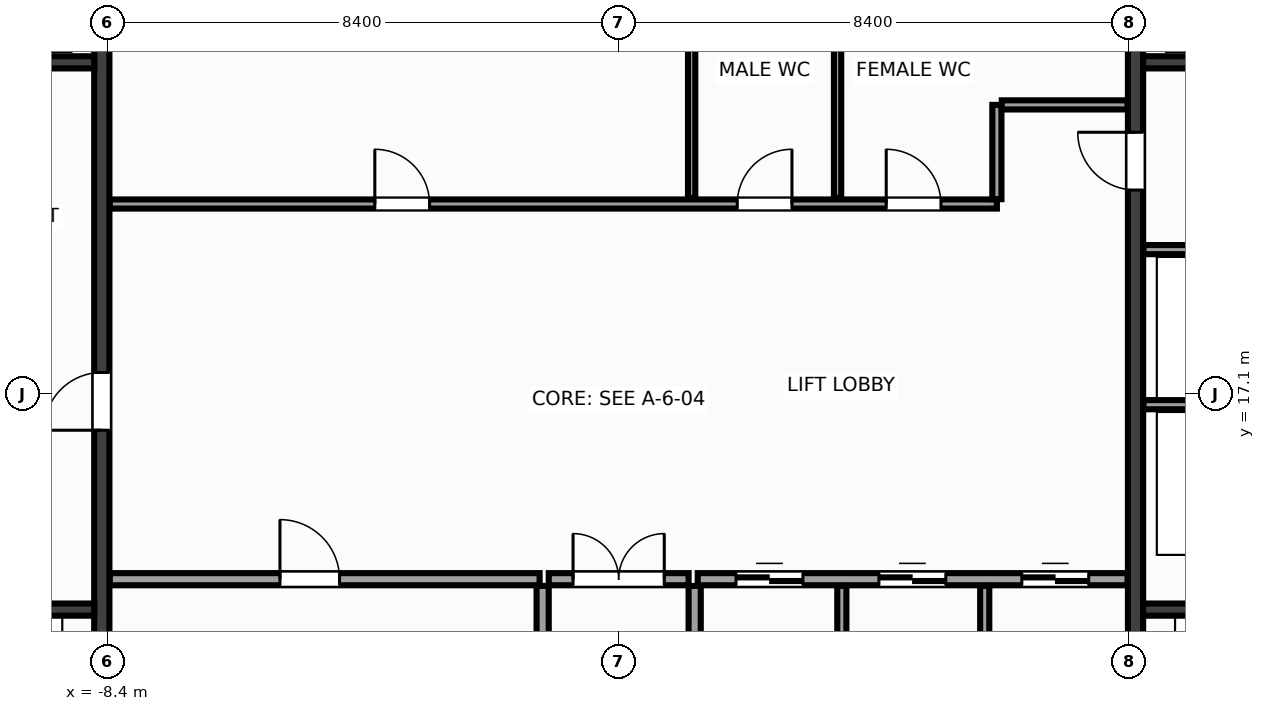
"""IFC4 building model, lengths in metres.
Left out: names, types, materials, properties, quantities, classifications, styles, units other than length and angle.
Written with IfcOpenShell. Run it as: python <this file> out.ifc"""

import sys

from ifc_helpers import new_model, si_unit, direction, frame, frame_2d, origin, place, context, subcontext, project, spatial, rectangle, extrude, source, transform, mapped, element, fill, save


model = new_model("IFC4")
c1 = context("Model", 3, precision=1e-05, world=origin(), true_north=direction((0.0, 1.0)))
c2 = subcontext(c1, "Body", "Model", "MODEL_VIEW")
j1 = project(units=[si_unit("LENGTHUNIT", "METRE"), si_unit("PLANEANGLEUNIT", "RADIAN")], contexts=[c1])
p1 = place(None, origin())
s1 = spatial("IfcSite", under=j1, at=p1, CompositionType="ELEMENT")
p2 = place(p1, origin())
s2 = spatial("IfcBuilding", under=s1, at=p2, CompositionType="ELEMENT")
p3 = place(p2, frame((0.0, 0.0, 88.4)))
s3 = spatial("IfcBuildingStorey", under=s2, at=p3, CompositionType="ELEMENT", Elevation=88.4)
m1 = source(origin(), c2, "Body", "SweptSolid", [
    extrude(rectangle(XDim=12.95, YDim=0.25, at=frame_2d((6.475, 0.0))), origin(), (0.0, 0.0, 1.0), 3.6),
])
p4 = place(p3, frame((-8.5, 10.525, 0.0), z_axis=(0.0, 0.0, 1.0), x_axis=(0.0, 1.0, 0.0)))
e1 = element("IfcWall", 1, at=p4, inside=s3, PredefinedType="SHEAR", context=c2, shape_type="MappedRepresentation", body=[
    mapped(m1, transform((0.0, 0.0, 0.0), x_axis=(1.0, 0.0, 0.0), y_axis=(0.0, 1.0, 0.0), z_axis=(0.0, 0.0, 1.0), scale=1.0)),
])
p5 = place(p4, frame((5.975, 0.0, 0.0)))
e2 = element("IfcOpeningElement", 2, at=p5, cuts=e1, PredefinedType="OPENING", context=c2, shape_type="SweptSolid", body=[
    extrude(rectangle(XDim=0.95, YDim=2.15, at=frame_2d((0.475, 1.075))), frame((0.0, 0.137, 0.0), z_axis=(0.0, -1.0, 0.0), x_axis=(1.0, 0.0, 0.0)), (0.0, 0.0, 1.0), 0.274),
])
p6 = place(p3, frame((8.5, 10.525, 0.0), z_axis=(0.0, 0.0, 1.0), x_axis=(0.0, 1.0, 0.0)))
e3 = element("IfcWall", 3, at=p6, inside=s3, PredefinedType="SHEAR", context=c2, shape_type="MappedRepresentation", body=[
    mapped(m1, transform((0.0, 0.0, 0.0), x_axis=(1.0, 0.0, 0.0), y_axis=(0.0, 1.0, 0.0), z_axis=(0.0, 0.0, 1.0), scale=1.0)),
])
p7 = place(p6, frame((9.925, 0.0, 0.0)))
e4 = element("IfcOpeningElement", 4, at=p7, cuts=e3, PredefinedType="OPENING", context=c2, shape_type="SweptSolid", body=[
    extrude(rectangle(XDim=0.95, YDim=2.15, at=frame_2d((0.475, 1.075))), frame((0.0, 0.137, 0.0), z_axis=(0.0, -1.0, 0.0), x_axis=(1.0, 0.0, 0.0)), (0.0, 0.0, 1.0), 0.274),
])
m2 = source(origin(), c2, "Body", "SweptSolid", [
    extrude(rectangle(XDim=2.825, YDim=0.2, at=frame_2d((1.413, 0.0))), origin(), (0.0, 0.0, 1.0), 3.6),
])
for number, where, z_axis, x_axis in (
    (5, (-11.45, 13.55, 0.0), (0.0, 0.0, 1.0), (1.0, 0.0, 0.0)),
    (6, (8.625, 13.55, 0.0), (0.0, 0.0, 1.0), (1.0, 0.0, 0.0)),
):
    element("IfcWall", number, at=place(p3, frame(where, z_axis=z_axis, x_axis=x_axis)), inside=s3, PredefinedType="SHEAR", context=c2, shape_type="MappedRepresentation", body=[
        mapped(m2, transform((0.0, 0.0, 0.0), x_axis=(1.0, 0.0, 0.0), y_axis=(0.0, 1.0, 0.0), z_axis=(0.0, 0.0, 1.0), scale=1.0)),
    ])
m3 = source(origin(), c2, "Body", "SweptSolid", [
    extrude(rectangle(XDim=3.02, YDim=0.2, at=frame_2d((1.51, 0.0))), origin(), (0.0, 0.0, 1.0), 3.6),
])
for number, where, z_axis, x_axis in (
    (7, (-11.645, 22.55, 0.0), (0.0, 0.0, 1.0), (1.0, 0.0, 0.0)),
    (8, (8.625, 22.55, 0.0), (0.0, 0.0, 1.0), (1.0, 0.0, 0.0)),
):
    element("IfcWall", number, at=place(p3, frame(where, z_axis=z_axis, x_axis=x_axis)), inside=s3, PredefinedType="SHEAR", context=c2, shape_type="MappedRepresentation", body=[
        mapped(m3, transform((0.0, 0.0, 0.0), x_axis=(1.0, 0.0, 0.0), y_axis=(0.0, 1.0, 0.0), z_axis=(0.0, 0.0, 1.0), scale=1.0)),
    ])
m4 = source(origin(), c2, "Body", "SweptSolid", [
    extrude(rectangle(XDim=3.01, YDim=0.15, at=frame_2d((1.505, 0.0))), origin(), (0.0, 0.0, 1.0), 3.36),
])
for number, where, z_axis, x_axis in (
    (9, (8.63, 16.92, 0.0), (0.0, 0.0, 1.0), (1.0, 0.0, 0.0)),
    (10, (8.63, 19.47, 0.0), (0.0, 0.0, 1.0), (1.0, 0.0, 0.0)),
):
    element("IfcWall", number, at=place(p3, frame(where, z_axis=z_axis, x_axis=x_axis)), inside=s3, PredefinedType="PARTITIONING", context=c2, shape_type="MappedRepresentation", body=[
        mapped(m4, transform((0.0, 0.0, 0.0), x_axis=(1.0, 0.0, 0.0), y_axis=(0.0, 1.0, 0.0), z_axis=(0.0, 0.0, 1.0), scale=1.0)),
    ])
m5 = source(origin(), c2, "Body", "SweptSolid", [
    extrude(rectangle(XDim=7.07, YDim=0.2, at=frame_2d((3.535, 0.0))), origin(), (0.0, 0.0, 1.0), 3.36),
])
p8 = place(p3, frame((-8.37, 14.05, 0.0), z_axis=(0.0, 0.0, 1.0), x_axis=(1.0, 0.0, 0.0)))
e11 = element("IfcWall", 11, at=p8, inside=s3, PredefinedType="PARTITIONING", context=c2, shape_type="MappedRepresentation", body=[
    mapped(m5, transform((0.0, 0.0, 0.0), x_axis=(1.0, 0.0, 0.0), y_axis=(0.0, 1.0, 0.0), z_axis=(0.0, 0.0, 1.0), scale=1.0)),
])
p9 = place(p8, frame((2.8, 0.0, 0.0)))
e12 = element("IfcOpeningElement", 12, at=p9, cuts=e11, PredefinedType="OPENING", context=c2, shape_type="SweptSolid", body=[
    extrude(rectangle(XDim=0.98, YDim=2.15, at=frame_2d((0.49, 1.075))), frame((0.0, 0.112, 0.0), z_axis=(0.0, -1.0, 0.0), x_axis=(1.0, 0.0, 0.0)), (0.0, 0.0, 1.0), 0.224),
])
p10 = place(p3, frame((1.3, 14.05, 0.0), z_axis=(0.0, 0.0, 1.0), x_axis=(1.0, 0.0, 0.0)))
e13 = element("IfcWall", 13, at=p10, inside=s3, PredefinedType="PARTITIONING", context=c2, shape_type="MappedRepresentation", body=[
    mapped(m5, transform((0.0, 0.0, 0.0), x_axis=(1.0, 0.0, 0.0), y_axis=(0.0, 1.0, 0.0), z_axis=(0.0, 0.0, 1.0), scale=1.0)),
])
p11 = place(p10, frame((0.63, 0.0, 0.0)))
e14 = element("IfcOpeningElement", 14, at=p11, cuts=e13, PredefinedType="OPENING", context=c2, shape_type="SweptSolid", body=[
    extrude(rectangle(XDim=1.1, YDim=2.15, at=frame_2d((0.55, 1.075))), frame((0.0, 0.112, 0.0), z_axis=(0.0, -1.0, 0.0), x_axis=(1.0, 0.0, 0.0)), (0.0, 0.0, 1.0), 0.224),
])
p12 = place(p10, frame((2.98, 0.0, 0.0)))
e15 = element("IfcOpeningElement", 15, at=p12, cuts=e13, PredefinedType="OPENING", context=c2, shape_type="SweptSolid", body=[
    extrude(rectangle(XDim=1.1, YDim=2.15, at=frame_2d((0.55, 1.075))), frame((0.0, 0.112, 0.0), z_axis=(0.0, -1.0, 0.0), x_axis=(1.0, 0.0, 0.0)), (0.0, 0.0, 1.0), 0.224),
])
p13 = place(p10, frame((5.33, 0.0, 0.0)))
e16 = element("IfcOpeningElement", 16, at=p13, cuts=e13, PredefinedType="OPENING", context=c2, shape_type="SweptSolid", body=[
    extrude(rectangle(XDim=1.1, YDim=2.15, at=frame_2d((0.55, 1.075))), frame((0.0, 0.112, 0.0), z_axis=(0.0, -1.0, 0.0), x_axis=(1.0, 0.0, 0.0)), (0.0, 0.0, 1.0), 0.224),
])
m6 = source(origin(), c2, "Body", "SweptSolid", [
    extrude(rectangle(XDim=3.415, YDim=0.2, at=frame_2d((1.708, 0.0))), origin(), (0.0, 0.0, 1.0), 3.36),
])
for number, where, z_axis, x_axis in (
    (17, (-1.25, 10.525, 0.0), (0.0, 0.0, 1.0), (0.0, 1.0, 0.0)),
    (18, (1.25, 10.525, 0.0), (0.0, 0.0, 1.0), (0.0, 1.0, 0.0)),
):
    element("IfcWall", number, at=place(p3, frame(where, z_axis=z_axis, x_axis=x_axis)), inside=s3, PredefinedType="PARTITIONING", context=c2, shape_type="MappedRepresentation", body=[
        mapped(m6, transform((0.0, 0.0, 0.0), x_axis=(1.0, 0.0, 0.0), y_axis=(0.0, 1.0, 0.0), z_axis=(0.0, 0.0, 1.0), scale=1.0)),
    ])
m7 = source(origin(), c2, "Body", "SweptSolid", [
    extrude(rectangle(XDim=2.3, YDim=0.2, at=frame_2d((1.15, 0.0))), origin(), (0.0, 0.0, 1.0), 3.36),
])
p14 = place(p3, frame((-1.15, 14.05, 0.0), z_axis=(0.0, 0.0, 1.0), x_axis=(1.0, 0.0, 0.0)))
e19 = element("IfcWall", 19, at=p14, inside=s3, PredefinedType="PARTITIONING", context=c2, shape_type="MappedRepresentation", body=[
    mapped(m7, transform((0.0, 0.0, 0.0), x_axis=(1.0, 0.0, 0.0), y_axis=(0.0, 1.0, 0.0), z_axis=(0.0, 0.0, 1.0), scale=1.0)),
])
p15 = place(p14, frame((0.4, 0.0, 0.0)))
e20 = element("IfcOpeningElement", 20, at=p15, cuts=e19, PredefinedType="OPENING", context=c2, shape_type="SweptSolid", body=[
    extrude(rectangle(XDim=1.5, YDim=2.2, at=frame_2d((0.75, 1.1))), frame((0.0, 0.112, 0.0), z_axis=(0.0, -1.0, 0.0), x_axis=(1.0, 0.0, 0.0)), (0.0, 0.0, 1.0), 0.224),
])
m8 = source(origin(), c2, "Body", "SweptSolid", [
    extrude(rectangle(XDim=14.59, YDim=0.15, at=frame_2d((7.295, 0.0))), origin(), (0.0, 0.0, 1.0), 3.36),
])
p16 = place(p3, frame((-8.37, 20.22, 0.0), z_axis=(0.0, 0.0, 1.0), x_axis=(1.0, 0.0, 0.0)))
e21 = element("IfcWall", 21, at=p16, inside=s3, PredefinedType="PARTITIONING", context=c2, shape_type="MappedRepresentation", body=[
    mapped(m8, transform((0.0, 0.0, 0.0), x_axis=(1.0, 0.0, 0.0), y_axis=(0.0, 1.0, 0.0), z_axis=(0.0, 0.0, 1.0), scale=1.0)),
])
p17 = place(p16, frame((4.36, 0.0, 0.0)))
e22 = element("IfcOpeningElement", 22, at=p17, cuts=e21, PredefinedType="OPENING", context=c2, shape_type="SweptSolid", body=[
    extrude(rectangle(XDim=0.9, YDim=2.15, at=frame_2d((0.45, 1.075))), frame((0.0, 0.087, 0.0), z_axis=(0.0, -1.0, 0.0), x_axis=(1.0, 0.0, 0.0)), (0.0, 0.0, 1.0), 0.174),
])
p18 = place(p16, frame((10.32, 0.0, 0.0)))
e23 = element("IfcOpeningElement", 23, at=p18, cuts=e21, PredefinedType="OPENING", context=c2, shape_type="SweptSolid", body=[
    extrude(rectangle(XDim=0.9, YDim=2.15, at=frame_2d((0.45, 1.075))), frame((0.0, 0.087, 0.0), z_axis=(0.0, -1.0, 0.0), x_axis=(1.0, 0.0, 0.0)), (0.0, 0.0, 1.0), 0.174),
])
p19 = place(p16, frame((12.77, 0.0, 0.0)))
e24 = element("IfcOpeningElement", 24, at=p19, cuts=e21, PredefinedType="OPENING", context=c2, shape_type="SweptSolid", body=[
    extrude(rectangle(XDim=0.9, YDim=2.15, at=frame_2d((0.45, 1.075))), frame((0.0, 0.087, 0.0), z_axis=(0.0, -1.0, 0.0), x_axis=(1.0, 0.0, 0.0)), (0.0, 0.0, 1.0), 0.174),
])
m9 = source(origin(), c2, "Body", "SweptSolid", [
    extrude(rectangle(XDim=1.55, YDim=0.15, at=frame_2d((0.775, 0.0))), origin(), (0.0, 0.0, 1.0), 3.36),
])
p20 = place(p3, frame((6.22, 20.3, 0.0), z_axis=(0.0, 0.0, 1.0), x_axis=(0.0, 1.0, 0.0)))
e25 = element("IfcWall", 25, at=p20, inside=s3, PredefinedType="PARTITIONING", context=c2, shape_type="MappedRepresentation", body=[
    mapped(m9, transform((0.0, 0.0, 0.0), x_axis=(1.0, 0.0, 0.0), y_axis=(0.0, 1.0, 0.0), z_axis=(0.0, 0.0, 1.0), scale=1.0)),
])
m10 = source(origin(), c2, "Body", "SweptSolid", [
    extrude(rectangle(XDim=2.07, YDim=0.15, at=frame_2d((1.035, 0.0))), origin(), (0.0, 0.0, 1.0), 3.36),
])
p21 = place(p3, frame((6.3, 21.85, 0.0), z_axis=(0.0, 0.0, 1.0), x_axis=(1.0, 0.0, 0.0)))
e26 = element("IfcWall", 26, at=p21, inside=s3, PredefinedType="PARTITIONING", context=c2, shape_type="MappedRepresentation", body=[
    mapped(m10, transform((0.0, 0.0, 0.0), x_axis=(1.0, 0.0, 0.0), y_axis=(0.0, 1.0, 0.0), z_axis=(0.0, 0.0, 1.0), scale=1.0)),
])
m11 = source(origin(), c2, "Body", "SweptSolid", [
    extrude(rectangle(XDim=3.415, YDim=0.15, at=frame_2d((1.708, 0.0))), origin(), (0.0, 0.0, 1.0), 3.36),
])
for number, where, z_axis, x_axis in (
    (27, (3.67, 10.525, 0.0), (0.0, 0.0, 1.0), (0.0, 1.0, 0.0)),
    (28, (6.02, 10.525, 0.0), (0.0, 0.0, 1.0), (0.0, 1.0, 0.0)),
):
    element("IfcWall", number, at=place(p3, frame(where, z_axis=z_axis, x_axis=x_axis)), inside=s3, PredefinedType="PARTITIONING", context=c2, shape_type="MappedRepresentation", body=[
        mapped(m11, transform((0.0, 0.0, 0.0), x_axis=(1.0, 0.0, 0.0), y_axis=(0.0, 1.0, 0.0), z_axis=(0.0, 0.0, 1.0), scale=1.0)),
    ])
m12 = source(origin(), c2, "Body", "SweptSolid", [
    extrude(rectangle(XDim=3.115, YDim=0.12, at=frame_2d((1.558, 0.0))), origin(), (0.0, 0.0, 1.0), 3.36),
])
for number, where, z_axis, x_axis in (
    (29, (1.2, 20.32, 0.0), (0.0, 0.0, 1.0), (0.0, 1.0, 0.0)),
    (30, (3.6, 20.32, 0.0), (0.0, 0.0, 1.0), (0.0, 1.0, 0.0)),
):
    element("IfcWall", number, at=place(p3, frame(where, z_axis=z_axis, x_axis=x_axis)), inside=s3, PredefinedType="PARTITIONING", context=c2, shape_type="MappedRepresentation", body=[
        mapped(m12, transform((0.0, 0.0, 0.0), x_axis=(1.0, 0.0, 0.0), y_axis=(0.0, 1.0, 0.0), z_axis=(0.0, 0.0, 1.0), scale=1.0)),
    ])
m13 = source(origin(), c2, "Body", "SweptSolid", [
    extrude(rectangle(XDim=0.95, YDim=2.15, at=frame_2d((0.475, 1.075))), frame((0.0, 0.025, 0.0), z_axis=(0.0, -1.0, 0.0), x_axis=(1.0, 0.0, 0.0)), (0.0, 0.0, 1.0), 0.05),
])
p22 = place(p5, origin())
e31 = element("IfcDoor", 31, at=p22, inside=s3, OperationType="SINGLE_SWING_LEFT", PredefinedType="DOOR", context=c2, shape_type="MappedRepresentation", body=[
    mapped(m13, transform((0.0, 0.0, 0.0), x_axis=(1.0, 0.0, 0.0), y_axis=(0.0, 1.0, 0.0), z_axis=(0.0, 0.0, 1.0), scale=1.0)),
])
fill(e2, e31)
m14 = source(origin(), c2, "Body", "SweptSolid", [
    extrude(rectangle(XDim=0.95, YDim=2.15, at=frame_2d((0.475, 1.075))), frame((0.0, 0.025, 0.0), z_axis=(0.0, -1.0, 0.0), x_axis=(1.0, 0.0, 0.0)), (0.0, 0.0, 1.0), 0.05),
])
p23 = place(p7, origin())
e32 = element("IfcDoor", 32, at=p23, inside=s3, OperationType="SINGLE_SWING_RIGHT", PredefinedType="DOOR", context=c2, shape_type="MappedRepresentation", body=[
    mapped(m14, transform((0.0, 0.0, 0.0), x_axis=(1.0, 0.0, 0.0), y_axis=(0.0, 1.0, 0.0), z_axis=(0.0, 0.0, 1.0), scale=1.0)),
])
fill(e4, e32)
m15 = source(origin(), c2, "Body", "SweptSolid", [
    extrude(rectangle(XDim=0.98, YDim=2.15, at=frame_2d((0.49, 1.075))), frame((0.0, 0.025, 0.0), z_axis=(0.0, -1.0, 0.0), x_axis=(1.0, 0.0, 0.0)), (0.0, 0.0, 1.0), 0.05),
])
p24 = place(p9, origin())
e33 = element("IfcDoor", 33, at=p24, inside=s3, OperationType="SINGLE_SWING_LEFT", PredefinedType="DOOR", context=c2, shape_type="MappedRepresentation", body=[
    mapped(m15, transform((0.0, 0.0, 0.0), x_axis=(1.0, 0.0, 0.0), y_axis=(0.0, 1.0, 0.0), z_axis=(0.0, 0.0, 1.0), scale=1.0)),
])
fill(e12, e33)
m16 = source(origin(), c2, "Body", "SweptSolid", [
    extrude(rectangle(XDim=1.1, YDim=2.15, at=frame_2d((0.55, 1.075))), frame((0.0, 0.025, 0.0), z_axis=(0.0, -1.0, 0.0), x_axis=(1.0, 0.0, 0.0)), (0.0, 0.0, 1.0), 0.05),
])
p25 = place(p11, origin())
e34 = element("IfcDoor", 34, at=p25, inside=s3, OperationType="DOUBLE_DOOR_SLIDING", PredefinedType="DOOR", context=c2, shape_type="MappedRepresentation", body=[
    mapped(m16, transform((0.0, 0.0, 0.0), x_axis=(1.0, 0.0, 0.0), y_axis=(0.0, 1.0, 0.0), z_axis=(0.0, 0.0, 1.0), scale=1.0)),
])
fill(e14, e34)
p26 = place(p12, origin())
e35 = element("IfcDoor", 35, at=p26, inside=s3, OperationType="DOUBLE_DOOR_SLIDING", PredefinedType="DOOR", context=c2, shape_type="MappedRepresentation", body=[
    mapped(m16, transform((0.0, 0.0, 0.0), x_axis=(1.0, 0.0, 0.0), y_axis=(0.0, 1.0, 0.0), z_axis=(0.0, 0.0, 1.0), scale=1.0)),
])
fill(e15, e35)
p27 = place(p13, origin())
e36 = element("IfcDoor", 36, at=p27, inside=s3, OperationType="DOUBLE_DOOR_SLIDING", PredefinedType="DOOR", context=c2, shape_type="MappedRepresentation", body=[
    mapped(m16, transform((0.0, 0.0, 0.0), x_axis=(1.0, 0.0, 0.0), y_axis=(0.0, 1.0, 0.0), z_axis=(0.0, 0.0, 1.0), scale=1.0)),
])
fill(e16, e36)
m17 = source(origin(), c2, "Body", "SweptSolid", [
    extrude(rectangle(XDim=1.5, YDim=2.2, at=frame_2d((0.75, 1.1))), frame((0.0, 0.025, 0.0), z_axis=(0.0, -1.0, 0.0), x_axis=(1.0, 0.0, 0.0)), (0.0, 0.0, 1.0), 0.05),
])
p28 = place(p15, origin())
e37 = element("IfcDoor", 37, at=p28, inside=s3, OperationType="DOUBLE_DOOR_SINGLE_SWING", PredefinedType="DOOR", context=c2, shape_type="MappedRepresentation", body=[
    mapped(m17, transform((0.0, 0.0, 0.0), x_axis=(1.0, 0.0, 0.0), y_axis=(0.0, 1.0, 0.0), z_axis=(0.0, 0.0, 1.0), scale=1.0)),
])
fill(e20, e37)
m18 = source(origin(), c2, "Body", "SweptSolid", [
    extrude(rectangle(XDim=0.9, YDim=2.15, at=frame_2d((0.45, 1.075))), frame((0.0, 0.025, 0.0), z_axis=(0.0, -1.0, 0.0), x_axis=(1.0, 0.0, 0.0)), (0.0, 0.0, 1.0), 0.05),
])
p29 = place(p17, origin())
e38 = element("IfcDoor", 38, at=p29, inside=s3, OperationType="SINGLE_SWING_LEFT", PredefinedType="DOOR", context=c2, shape_type="MappedRepresentation", body=[
    mapped(m18, transform((0.0, 0.0, 0.0), x_axis=(1.0, 0.0, 0.0), y_axis=(0.0, 1.0, 0.0), z_axis=(0.0, 0.0, 1.0), scale=1.0)),
])
fill(e22, e38)
p30 = place(p18, origin())
e39 = element("IfcDoor", 39, at=p30, inside=s3, OperationType="SINGLE_SWING_RIGHT", PredefinedType="DOOR", context=c2, shape_type="MappedRepresentation", body=[
    mapped(m18, transform((0.0, 0.0, 0.0), x_axis=(1.0, 0.0, 0.0), y_axis=(0.0, 1.0, 0.0), z_axis=(0.0, 0.0, 1.0), scale=1.0)),
])
fill(e23, e39)
p31 = place(p19, origin())
e40 = element("IfcDoor", 40, at=p31, inside=s3, OperationType="SINGLE_SWING_LEFT", PredefinedType="DOOR", context=c2, shape_type="MappedRepresentation", body=[
    mapped(m18, transform((0.0, 0.0, 0.0), x_axis=(1.0, 0.0, 0.0), y_axis=(0.0, 1.0, 0.0), z_axis=(0.0, 0.0, 1.0), scale=1.0)),
])
fill(e24, e40)
save(model, sys.argv[1])
